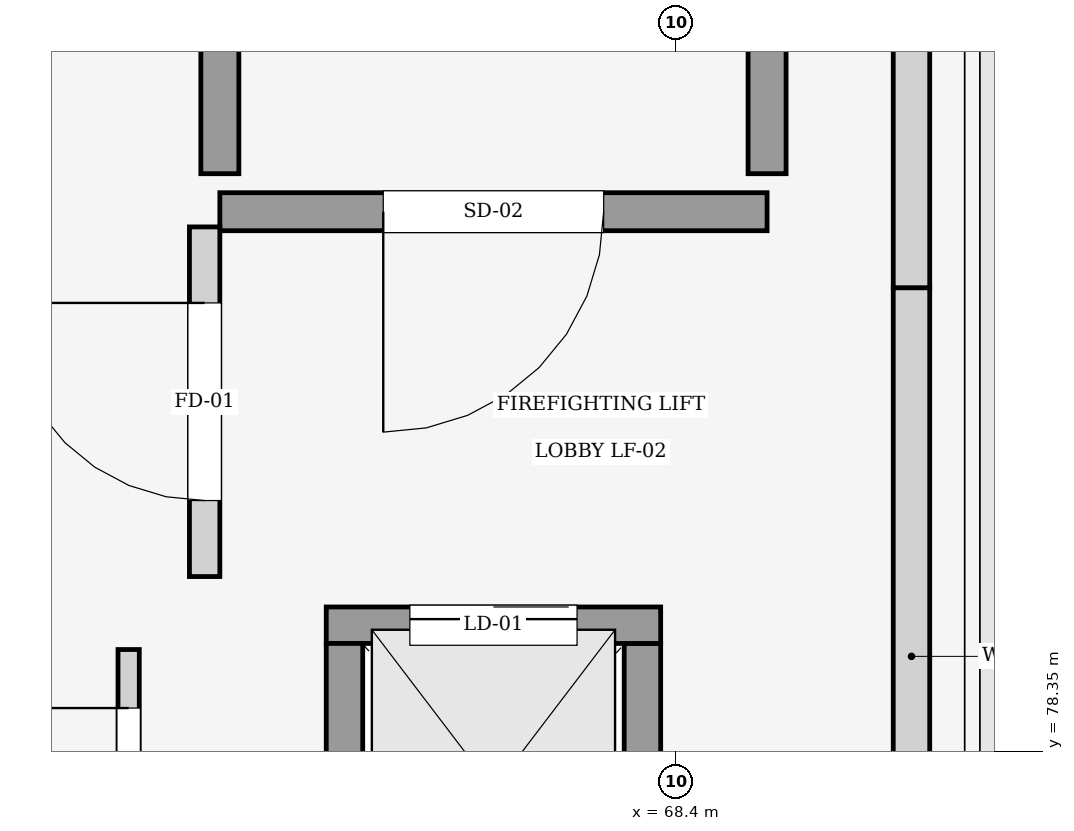
"""IFC4 building model, lengths in metres.
Left out: names, types, materials, properties, quantities, classifications, styles, units other than length and angle.
Written with IfcOpenShell. Run it as: python <this file> out.ifc"""

import sys

from ifc_helpers import new_model, si_unit, direction, frame, frame_2d, origin, place, context, subcontext, project, spatial, rectangle, extrude, element, fill, save


model = new_model("IFC4")
c1 = context("Model", 3, precision=1e-05, world=origin(), true_north=direction((0.0, 1.0)))
c2 = subcontext(c1, "Body", "Model", "MODEL_VIEW")
j1 = project(units=[si_unit("LENGTHUNIT", "METRE"), si_unit("PLANEANGLEUNIT", "RADIAN")], contexts=[c1])
p1 = place(None, origin())
s1 = spatial("IfcSite", under=j1, at=p1, CompositionType="ELEMENT")
p2 = place(p1, origin())
s2 = spatial("IfcBuilding", under=s1, at=p2, CompositionType="ELEMENT")
p3 = place(p2, frame((0.0, 0.0, 29.4)))
s3 = spatial("IfcBuildingStorey", under=s2, at=p3, CompositionType="ELEMENT", Elevation=29.4)
p4 = place(p3, frame((69.95, 81.4, 4.7), z_axis=(0.0, 0.0, 1.0), x_axis=(0.0, -1.0, 0.0)))
e1 = element("IfcWall", 1, at=p4, inside=s3, PredefinedType="STANDARD", context=c2, shape_type="SweptSolid", body=[
    extrude(rectangle(XDim=4.85, YDim=0.24, at=frame_2d((2.425, 0.0))), origin(), (0.0, 0.0, 1.0), 3.8),
])
p5 = place(p3, frame((69.95, 86.6, 4.7), z_axis=(0.0, 0.0, 1.0), x_axis=(0.0, -1.0, 0.0)))
e2 = element("IfcWall", 2, at=p5, inside=s3, PredefinedType="STANDARD", context=c2, shape_type="SweptSolid", body=[
    extrude(rectangle(XDim=5.2, YDim=0.24, at=frame_2d((2.6, 0.0))), origin(), (0.0, 0.0, 1.0), 4.85),
])
p6 = place(p3, frame((69.0, 81.9, 0.0), z_axis=(0.0, 0.0, 1.0), x_axis=(-1.0, 0.0, 0.0)))
e3 = element("IfcWall", 3, at=p6, inside=s3, PredefinedType="SHEAR", context=c2, shape_type="SweptSolid", body=[
    extrude(rectangle(XDim=3.6, YDim=0.25, at=frame_2d((1.8, 0.0))), origin(), (0.0, 0.0, 1.0), 4.75),
])
p7 = place(p6, frame((1.075, 0.0, 0.0)))
e4 = element("IfcOpeningElement", 4, at=p7, cuts=e3, PredefinedType="OPENING", context=c2, shape_type="SweptSolid", body=[
    extrude(rectangle(XDim=1.45, YDim=2.2, at=frame_2d((0.725, 1.1))), frame((0.0, 0.135, 0.0), z_axis=(0.0, -1.0, 0.0), x_axis=(1.0, 0.0, 0.0)), (0.0, 0.0, 1.0), 0.27),
])
for number, where, z_axis, x_axis in (
    (5, (65.4, 82.15, 0.0), (0.0, 0.0, 1.0), (0.0, 1.0, 0.0)),
    (6, (69.0, 89.85, 0.0), (0.0, 0.0, 1.0), (0.0, -1.0, 0.0)),
):
    element("IfcWall", number, at=place(p3, frame(where, z_axis=z_axis, x_axis=x_axis)), inside=s3, PredefinedType="SHEAR", context=c2, shape_type="SweptSolid", body=[
        extrude(rectangle(XDim=7.7, YDim=0.25, at=frame_2d((3.85, 0.0))), origin(), (0.0, 0.0, 1.0), 4.75),
    ])
p8 = place(p3, frame((68.18, 79.06, 0.0), z_axis=(0.0, 0.0, 1.0), x_axis=(0.0, -1.0, 0.0)))
e7 = element("IfcWall", 7, at=p8, inside=s3, PredefinedType="SHEAR", context=c2, shape_type="SweptSolid", body=[
    extrude(rectangle(XDim=1.92, YDim=0.24, at=frame_2d((0.96, 0.0))), origin(), (0.0, 0.0, 1.0), 4.75),
])
p9 = place(p3, frame((66.1, 79.18, 0.0), z_axis=(0.0, 0.0, 1.0), x_axis=(1.0, 0.0, 0.0)))
e8 = element("IfcWall", 8, at=p9, inside=s3, PredefinedType="SHEAR", context=c2, shape_type="SweptSolid", body=[
    extrude(rectangle(XDim=2.2, YDim=0.24, at=frame_2d((1.1, 0.0))), origin(), (0.0, 0.0, 1.0), 4.75),
])
p10 = place(p9, frame((0.55, 0.0, 0.0)))
e9 = element("IfcOpeningElement", 9, at=p10, cuts=e8, PredefinedType="OPENING", context=c2, shape_type="SweptSolid", body=[
    extrude(rectangle(XDim=1.1, YDim=2.15, at=frame_2d((0.55, 1.075))), frame((0.0, 0.13, 0.0), z_axis=(0.0, -1.0, 0.0), x_axis=(1.0, 0.0, 0.0)), (0.0, 0.0, 1.0), 0.26),
])
p11 = place(p3, frame((66.22, 77.14, 0.0), z_axis=(0.0, 0.0, 1.0), x_axis=(0.0, 1.0, 0.0)))
e10 = element("IfcWall", 10, at=p11, inside=s3, PredefinedType="SHEAR", context=c2, shape_type="SweptSolid", body=[
    extrude(rectangle(XDim=1.92, YDim=0.24, at=frame_2d((0.96, 0.0))), origin(), (0.0, 0.0, 1.0), 4.75),
])
p12 = place(p3, frame((65.3, 79.5, 0.0), z_axis=(0.0, 0.0, 1.0), x_axis=(0.0, 1.0, 0.0)))
e11 = element("IfcWall", 11, at=p12, inside=s3, PredefinedType="PARTITIONING", context=c2, shape_type="SweptSolid", body=[
    extrude(rectangle(XDim=2.3, YDim=0.2, at=frame_2d((1.15, 0.0))), origin(), (0.0, 0.0, 1.0), 2.9),
])
p13 = place(p12, frame((0.5, 0.0, 0.0)))
e12 = element("IfcOpeningElement", 12, at=p13, cuts=e11, PredefinedType="OPENING", context=c2, shape_type="SweptSolid", body=[
    extrude(rectangle(XDim=1.3, YDim=2.2, at=frame_2d((0.65, 1.1))), frame((0.0, 0.11, 0.0), z_axis=(0.0, -1.0, 0.0), x_axis=(1.0, 0.0, 0.0)), (0.0, 0.0, 1.0), 0.22),
])
p14 = place(p3, frame((64.8, 77.15, 0.0), z_axis=(0.0, 0.0, 1.0), x_axis=(0.0, 1.0, 0.0)))
e13 = element("IfcWall", 13, at=p14, inside=s3, PredefinedType="PARTITIONING", context=c2, shape_type="SweptSolid", body=[
    extrude(rectangle(XDim=1.87, YDim=0.14, at=frame_2d((0.935, 0.0))), origin(), (0.0, 0.0, 1.0), 4.57),
])
p15 = place(p14, frame((0.385, 0.0, 0.0)))
e14 = element("IfcOpeningElement", 14, at=p15, cuts=e13, PredefinedType="OPENING", context=c2, shape_type="SweptSolid", body=[
    extrude(rectangle(XDim=1.1, YDim=2.1, at=frame_2d((0.55, 1.05))), frame((0.0, 0.08, 0.0), z_axis=(0.0, -1.0, 0.0), x_axis=(1.0, 0.0, 0.0)), (0.0, 0.0, 1.0), 0.16),
])
p16 = place(p7, origin())
e15 = element("IfcDoor", 15, at=p16, inside=s3, OperationType="SINGLE_SWING_RIGHT", PredefinedType="DOOR", context=c2, shape_type="SweptSolid", body=[
    extrude(rectangle(XDim=1.45, YDim=2.2, at=frame_2d((0.725, 1.1))), frame((0.0, 0.025, 0.0), z_axis=(0.0, -1.0, 0.0), x_axis=(1.0, 0.0, 0.0)), (0.0, 0.0, 1.0), 0.05),
])
fill(e4, e15)
p17 = place(p10, origin())
e16 = element("IfcDoor", 16, at=p17, inside=s3, OperationType="SLIDING_TO_RIGHT", PredefinedType="DOOR", context=c2, shape_type="SweptSolid", body=[
    extrude(rectangle(XDim=1.1, YDim=2.15, at=frame_2d((0.55, 1.075))), frame((0.0, 0.025, 0.0), z_axis=(0.0, -1.0, 0.0), x_axis=(1.0, 0.0, 0.0)), (0.0, 0.0, 1.0), 0.05),
])
fill(e9, e16)
p18 = place(p13, origin())
e17 = element("IfcDoor", 17, at=p18, inside=s3, OperationType="SINGLE_SWING_RIGHT", PredefinedType="DOOR", context=c2, shape_type="SweptSolid", body=[
    extrude(rectangle(XDim=1.3, YDim=2.2, at=frame_2d((0.65, 1.1))), frame((0.0, 0.025, 0.0), z_axis=(0.0, -1.0, 0.0), x_axis=(1.0, 0.0, 0.0)), (0.0, 0.0, 1.0), 0.05),
])
fill(e12, e17)
p19 = place(p15, origin())
e18 = element("IfcDoor", 18, at=p19, inside=s3, OperationType="SINGLE_SWING_RIGHT", PredefinedType="DOOR", context=c2, shape_type="SweptSolid", body=[
    extrude(rectangle(XDim=1.1, YDim=2.1, at=frame_2d((0.55, 1.05))), frame((0.0, 0.025, 0.0), z_axis=(0.0, -1.0, 0.0), x_axis=(1.0, 0.0, 0.0)), (0.0, 0.0, 1.0), 0.05),
])
fill(e14, e18)
save(model, sys.argv[1])
